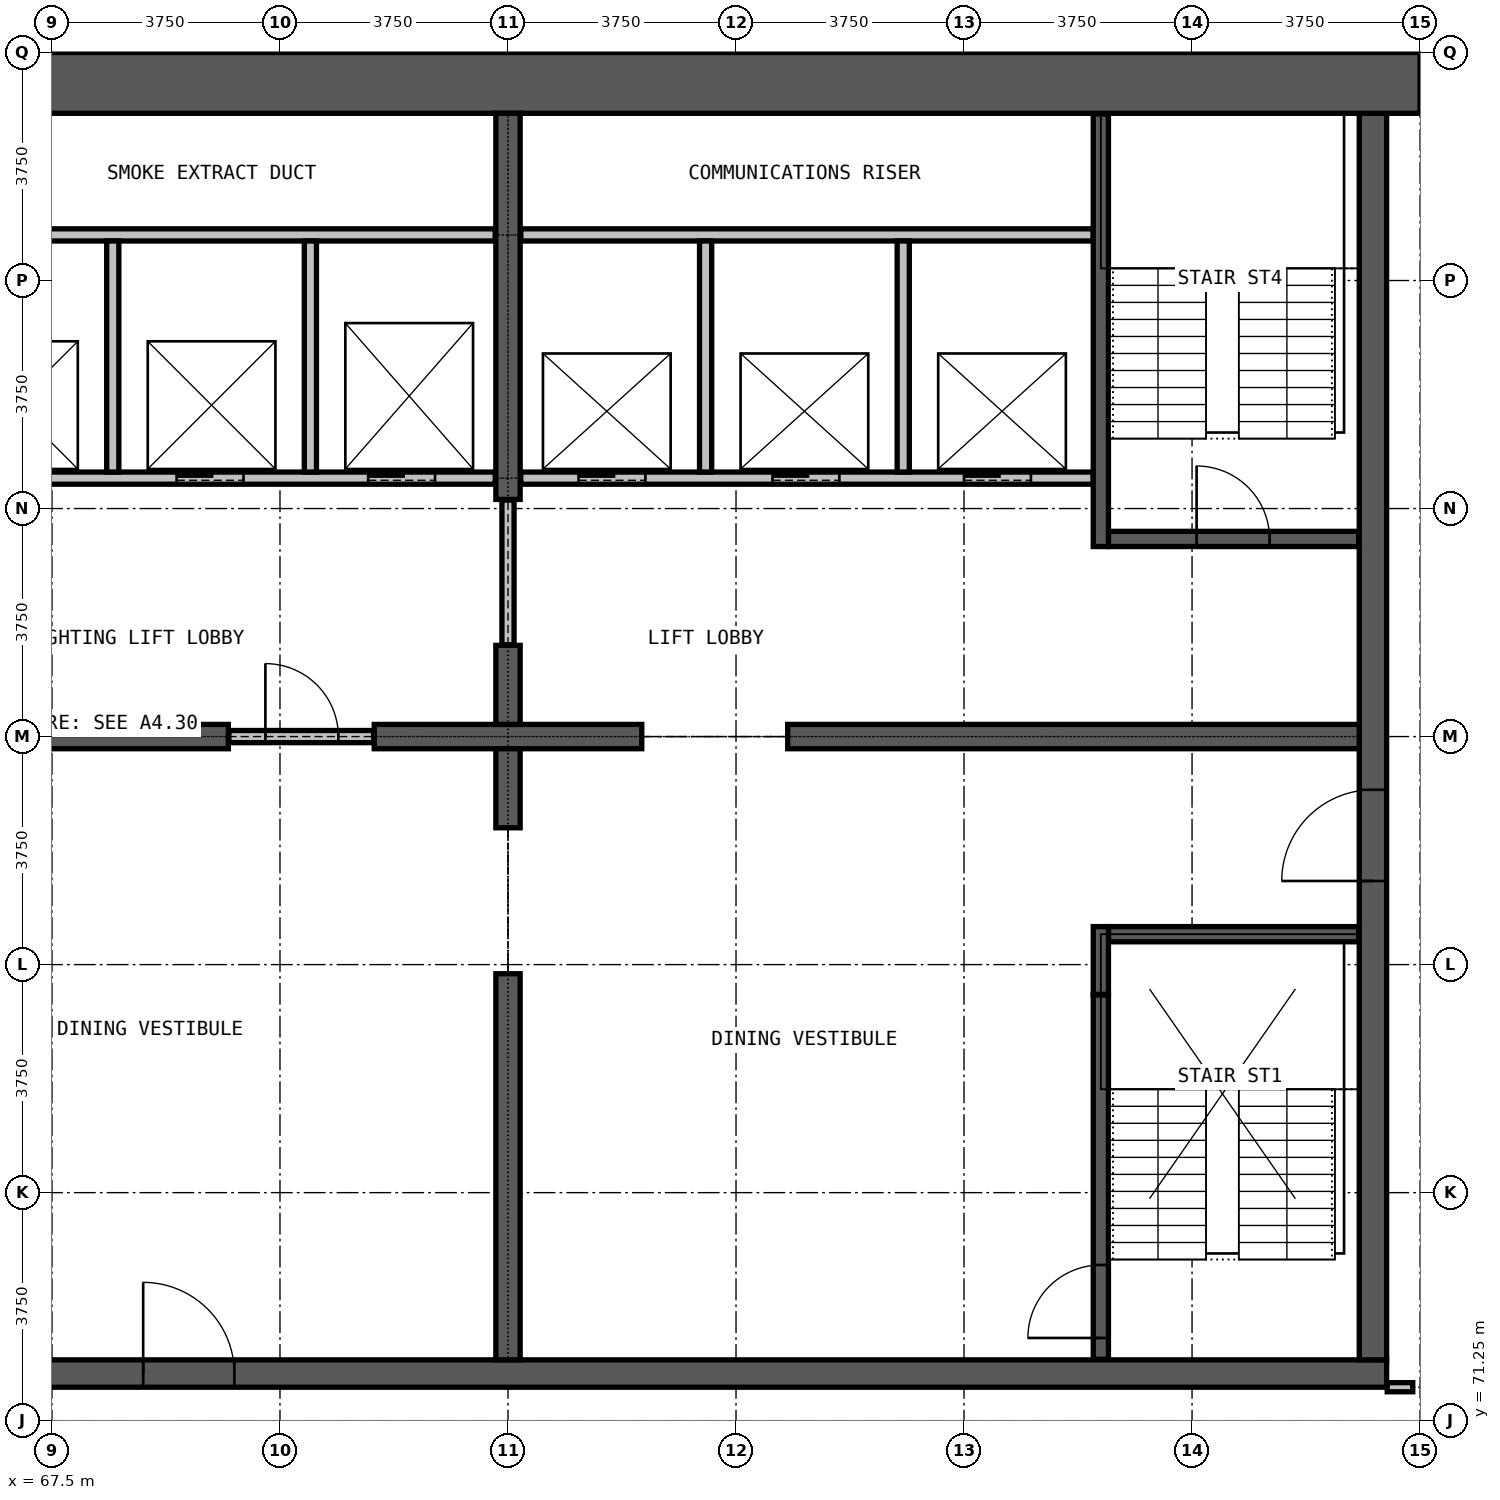
"""IFC4 building model, lengths in metres.
Left out: names, types, materials, properties, quantities, classifications, styles, units other than length and angle.
Written with IfcOpenShell. Run it as: python <this file> out.ifc"""

import sys

from ifc_helpers import new_model, si_unit, direction, frame, frame_2d, origin, place, context, subcontext, project, spatial, rectangle, extrude, element, fill, save


model = new_model("IFC4")
c1 = context("Model", 3, precision=1e-05, world=origin(), true_north=direction((0.0, 1.0)))
c2 = subcontext(c1, "Body", "Model", "MODEL_VIEW")
j1 = project(units=[si_unit("LENGTHUNIT", "METRE"), si_unit("PLANEANGLEUNIT", "RADIAN")], contexts=[c1])
p1 = place(None, origin())
s1 = spatial("IfcSite", under=j1, at=p1, CompositionType="ELEMENT")
p2 = place(p1, origin())
s2 = spatial("IfcBuilding", under=s1, at=p2, CompositionType="ELEMENT")
p3 = place(p2, frame((0.0, 0.0, 276.5)))
s3 = spatial("IfcBuildingStorey", under=s2, at=p3, CompositionType="ELEMENT", Elevation=276.5)
p4 = place(p3, frame((60.55, 72.025, 0.0), z_axis=(0.0, 0.0, 1.0), x_axis=(1.0, 0.0, 0.0)))
e1 = element("IfcWall", 1, at=p4, inside=s3, PredefinedType="SHEAR", context=c2, shape_type="SweptSolid", body=[
    extrude(rectangle(XDim=28.9, YDim=0.45, at=frame_2d((14.45, 0.0))), origin(), (0.0, 0.0, 1.0), 3.6),
])
p5 = place(p4, frame((8.45, 0.0, 0.0)))
e2 = element("IfcOpeningElement", 2, at=p5, cuts=e1, PredefinedType="OPENING", context=c2, shape_type="SweptSolid", body=[
    extrude(rectangle(XDim=1.5, YDim=2.2, at=frame_2d((0.75, 1.1))), frame((0.0, 0.235, 0.0), z_axis=(0.0, -1.0, 0.0), x_axis=(1.0, 0.0, 0.0)), (0.0, 0.0, 1.0), 0.47),
])
p6 = place(p3, frame((89.225, 72.25, 0.0), z_axis=(0.0, 0.0, 1.0), x_axis=(0.0, 1.0, 0.0)))
e3 = element("IfcWall", 3, at=p6, inside=s3, PredefinedType="SHEAR", context=c2, shape_type="SweptSolid", body=[
    extrude(rectangle(XDim=20.5, YDim=0.45, at=frame_2d((10.25, 0.0))), origin(), (0.0, 0.0, 1.0), 3.6),
])
p7 = place(p6, frame((7.875, 0.0, 0.0)))
e4 = element("IfcOpeningElement", 4, at=p7, cuts=e3, PredefinedType="OPENING", context=c2, shape_type="SweptSolid", body=[
    extrude(rectangle(XDim=1.5, YDim=2.2, at=frame_2d((0.75, 1.1))), frame((0.0, 0.235, 0.0), z_axis=(0.0, -1.0, 0.0), x_axis=(1.0, 0.0, 0.0)), (0.0, 0.0, 1.0), 0.47),
])
p8 = place(p3, frame((90.0, 93.25, 0.0), z_axis=(0.0, 0.0, 1.0), x_axis=(-1.0, 0.0, 0.0)))
e5 = element("IfcWall", 5, at=p8, inside=s3, PredefinedType="SHEAR", context=c2, shape_type="SweptSolid", body=[
    extrude(rectangle(XDim=30.0, YDim=1.0, at=frame_2d((15.0, 0.0))), origin(), (0.0, 0.0, 1.0), 3.6),
])
p9 = place(p3, frame((61.0, 82.5, 0.0), z_axis=(0.0, 0.0, 1.0), x_axis=(1.0, 0.0, 0.0)))
e6 = element("IfcWall", 6, at=p9, inside=s3, PredefinedType="SHEAR", context=c2, shape_type="SweptSolid", body=[
    extrude(rectangle(XDim=9.4, YDim=0.4, at=frame_2d((4.7, 0.0))), origin(), (0.0, 0.0, 1.0), 3.6),
])
p10 = place(p3, frame((72.8, 82.5, 0.0), z_axis=(0.0, 0.0, 1.0), x_axis=(1.0, 0.0, 0.0)))
e7 = element("IfcWall", 7, at=p10, inside=s3, PredefinedType="SHEAR", context=c2, shape_type="SweptSolid", body=[
    extrude(rectangle(XDim=4.4, YDim=0.4, at=frame_2d((2.2, 0.0))), origin(), (0.0, 0.0, 1.0), 3.6),
])
p11 = place(p3, frame((79.6, 82.5, 0.0), z_axis=(0.0, 0.0, 1.0), x_axis=(1.0, 0.0, 0.0)))
e8 = element("IfcWall", 8, at=p11, inside=s3, PredefinedType="SHEAR", context=c2, shape_type="SweptSolid", body=[
    extrude(rectangle(XDim=9.4, YDim=0.4, at=frame_2d((4.7, 0.0))), origin(), (0.0, 0.0, 1.0), 3.6),
])
p12 = place(p3, frame((75.0, 72.25, 0.0), z_axis=(0.0, 0.0, 1.0), x_axis=(0.0, 1.0, 0.0)))
e9 = element("IfcWall", 9, at=p12, inside=s3, PredefinedType="SHEAR", context=c2, shape_type="SweptSolid", body=[
    extrude(rectangle(XDim=6.35, YDim=0.4, at=frame_2d((3.175, 0.0))), origin(), (0.0, 0.0, 1.0), 3.6),
])
for number, where, z_axis, x_axis in (
    (10, (75.0, 81.0, 0.0), (0.0, 0.0, 1.0), (0.0, 1.0, 0.0)),
    (11, (75.0, 82.7, 0.0), (0.0, 0.0, 1.0), (0.0, 1.0, 0.0)),
):
    element("IfcWall", number, at=place(p3, frame(where, z_axis=z_axis, x_axis=x_axis)), inside=s3, PredefinedType="SHEAR", context=c2, shape_type="SweptSolid", body=[
        extrude(rectangle(XDim=1.3, YDim=0.4, at=frame_2d((0.65, 0.0))), origin(), (0.0, 0.0, 1.0), 3.6),
    ])
p13 = place(p3, frame((75.0, 86.4, 0.0), z_axis=(0.0, 0.0, 1.0), x_axis=(0.0, 1.0, 0.0)))
e12 = element("IfcWall", 12, at=p13, inside=s3, PredefinedType="SHEAR", context=c2, shape_type="SweptSolid", body=[
    extrude(rectangle(XDim=6.35, YDim=0.4, at=frame_2d((3.175, 0.0))), origin(), (0.0, 0.0, 1.0), 3.6),
])
p14 = place(p3, frame((70.41, 82.5, 0.0), z_axis=(0.0, 0.0, 1.0), x_axis=(1.0, 0.0, 0.0)))
e13 = element("IfcWall", 13, at=p14, inside=s3, PredefinedType="PARTITIONING", context=c2, shape_type="SweptSolid", body=[
    extrude(rectangle(XDim=2.38, YDim=0.2, at=frame_2d((1.19, 0.0))), origin(), (0.0, 0.0, 1.0), 2.4),
])
p15 = place(p14, frame((0.6, 0.0, 0.0)))
e14 = element("IfcOpeningElement", 14, at=p15, cuts=e13, PredefinedType="OPENING", context=c2, shape_type="SweptSolid", body=[
    extrude(rectangle(XDim=1.2, YDim=2.2, at=frame_2d((0.6, 1.1))), frame((0.0, 0.11, 0.0), z_axis=(0.0, -1.0, 0.0), x_axis=(1.0, 0.0, 0.0)), (0.0, 0.0, 1.0), 0.22),
])
p16 = place(p3, frame((75.0, 84.01, 0.0), z_axis=(0.0, 0.0, 1.0), x_axis=(0.0, 1.0, 0.0)))
e15 = element("IfcWall", 15, at=p16, inside=s3, PredefinedType="PARTITIONING", context=c2, shape_type="SweptSolid", body=[
    extrude(rectangle(XDim=2.38, YDim=0.2, at=frame_2d((1.19, 0.0))), origin(), (0.0, 0.0, 1.0), 2.4),
])
p17 = place(p3, frame((89.46, 71.8, 0.0), z_axis=(0.0, 0.0, 1.0), x_axis=(1.0, 0.0, 0.0)))
e16 = element("IfcWall", 16, at=p17, inside=s3, PredefinedType="PARTITIONING", context=c2, shape_type="SweptSolid", body=[
    extrude(rectangle(XDim=0.42, YDim=0.15, at=frame_2d((0.21, 0.0))), origin(), (0.0, 0.0, 1.0), 3.3),
])
p18 = place(p3, frame((65.375, 86.75, 0.0), z_axis=(0.0, 0.0, 1.0), x_axis=(1.0, 0.0, 0.0)))
e17 = element("IfcWall", 17, at=p18, inside=s3, PredefinedType="PARTITIONING", context=c2, shape_type="SweptSolid", body=[
    extrude(rectangle(XDim=9.415, YDim=0.2, at=frame_2d((4.708, 0.0))), origin(), (0.0, 0.0, 1.0), 3.3),
])
p19 = place(p18, frame((1.0, 0.0, 0.0)))
e18 = element("IfcOpeningElement", 18, at=p19, cuts=e17, PredefinedType="OPENING", context=c2, shape_type="SweptSolid", body=[
    extrude(rectangle(XDim=1.1, YDim=2.2, at=frame_2d((0.55, 1.1))), frame((0.0, 0.11, 0.0), z_axis=(0.0, -1.0, 0.0), x_axis=(1.0, 0.0, 0.0)), (0.0, 0.0, 1.0), 0.22),
])
p20 = place(p18, frame((4.175, 0.0, 0.0)))
e19 = element("IfcOpeningElement", 19, at=p20, cuts=e17, PredefinedType="OPENING", context=c2, shape_type="SweptSolid", body=[
    extrude(rectangle(XDim=1.1, YDim=2.2, at=frame_2d((0.55, 1.1))), frame((0.0, 0.11, 0.0), z_axis=(0.0, -1.0, 0.0), x_axis=(1.0, 0.0, 0.0)), (0.0, 0.0, 1.0), 0.22),
])
p21 = place(p18, frame((7.325, 0.0, 0.0)))
e20 = element("IfcOpeningElement", 20, at=p21, cuts=e17, PredefinedType="OPENING", context=c2, shape_type="SweptSolid", body=[
    extrude(rectangle(XDim=1.1, YDim=2.2, at=frame_2d((0.55, 1.1))), frame((0.0, 0.11, 0.0), z_axis=(0.0, -1.0, 0.0), x_axis=(1.0, 0.0, 0.0)), (0.0, 0.0, 1.0), 0.22),
])
p22 = place(p3, frame((75.21, 86.75, 0.0), z_axis=(0.0, 0.0, 1.0), x_axis=(1.0, 0.0, 0.0)))
e21 = element("IfcWall", 21, at=p22, inside=s3, PredefinedType="PARTITIONING", context=c2, shape_type="SweptSolid", body=[
    extrude(rectangle(XDim=9.415, YDim=0.2, at=frame_2d((4.708, 0.0))), origin(), (0.0, 0.0, 1.0), 3.3),
])
p23 = place(p22, frame((0.95, 0.0, 0.0)))
e22 = element("IfcOpeningElement", 22, at=p23, cuts=e21, PredefinedType="OPENING", context=c2, shape_type="SweptSolid", body=[
    extrude(rectangle(XDim=1.1, YDim=2.2, at=frame_2d((0.55, 1.1))), frame((0.0, 0.11, 0.0), z_axis=(0.0, -1.0, 0.0), x_axis=(1.0, 0.0, 0.0)), (0.0, 0.0, 1.0), 0.22),
])
p24 = place(p22, frame((4.14, 0.0, 0.0)))
e23 = element("IfcOpeningElement", 23, at=p24, cuts=e21, PredefinedType="OPENING", context=c2, shape_type="SweptSolid", body=[
    extrude(rectangle(XDim=1.1, YDim=2.2, at=frame_2d((0.55, 1.1))), frame((0.0, 0.11, 0.0), z_axis=(0.0, -1.0, 0.0), x_axis=(1.0, 0.0, 0.0)), (0.0, 0.0, 1.0), 0.22),
])
p25 = place(p22, frame((7.29, 0.0, 0.0)))
e24 = element("IfcOpeningElement", 24, at=p25, cuts=e21, PredefinedType="OPENING", context=c2, shape_type="SweptSolid", body=[
    extrude(rectangle(XDim=1.1, YDim=2.2, at=frame_2d((0.55, 1.1))), frame((0.0, 0.11, 0.0), z_axis=(0.0, -1.0, 0.0), x_axis=(1.0, 0.0, 0.0)), (0.0, 0.0, 1.0), 0.22),
])
for number, where, z_axis, x_axis in (
    (25, (65.375, 90.75, 0.0), (0.0, 0.0, 1.0), (1.0, 0.0, 0.0)),
    (26, (75.21, 90.75, 0.0), (0.0, 0.0, 1.0), (1.0, 0.0, 0.0)),
):
    element("IfcWall", number, at=place(p3, frame(where, z_axis=z_axis, x_axis=x_axis)), inside=s3, PredefinedType="PARTITIONING", context=c2, shape_type="SweptSolid", body=[
        extrude(rectangle(XDim=9.415, YDim=0.2, at=frame_2d((4.708, 0.0))), origin(), (0.0, 0.0, 1.0), 3.3),
    ])
for number, where, z_axis, x_axis in (
    (27, (68.5, 86.85, 0.0), (0.0, 0.0, 1.0), (0.0, 1.0, 0.0)),
    (28, (71.75, 86.85, 0.0), (0.0, 0.0, 1.0), (0.0, 1.0, 0.0)),
    (29, (78.25, 86.85, 0.0), (0.0, 0.0, 1.0), (0.0, 1.0, 0.0)),
    (30, (81.5, 86.85, 0.0), (0.0, 0.0, 1.0), (0.0, 1.0, 0.0)),
):
    element("IfcWall", number, at=place(p3, frame(where, z_axis=z_axis, x_axis=x_axis)), inside=s3, PredefinedType="PARTITIONING", context=c2, shape_type="SweptSolid", body=[
        extrude(rectangle(XDim=3.8, YDim=0.2, at=frame_2d((1.9, 0.0))), origin(), (0.0, 0.0, 1.0), 3.3),
    ])
p26 = place(p3, frame((84.875, 79.25, 0.0), z_axis=(0.0, 0.0, 1.0), x_axis=(1.0, 0.0, 0.0)))
e31 = element("IfcWall", 31, at=p26, inside=s3, PredefinedType="PARTITIONING", context=c2, shape_type="SweptSolid", body=[
    extrude(rectangle(XDim=4.115, YDim=0.25, at=frame_2d((2.058, 0.0))), origin(), (0.0, 0.0, 1.0), 3.3),
])
p27 = place(p3, frame((84.875, 85.75, 0.0), z_axis=(0.0, 0.0, 1.0), x_axis=(1.0, 0.0, 0.0)))
e32 = element("IfcWall", 32, at=p27, inside=s3, PredefinedType="PARTITIONING", context=c2, shape_type="SweptSolid", body=[
    extrude(rectangle(XDim=4.115, YDim=0.25, at=frame_2d((2.058, 0.0))), origin(), (0.0, 0.0, 1.0), 3.3),
])
p28 = place(p27, frame((1.45, 0.0, 0.0)))
e33 = element("IfcOpeningElement", 33, at=p28, cuts=e32, PredefinedType="OPENING", context=c2, shape_type="SweptSolid", body=[
    extrude(rectangle(XDim=1.2, YDim=2.2, at=frame_2d((0.6, 1.1))), frame((0.0, 0.135, 0.0), z_axis=(0.0, -1.0, 0.0), x_axis=(1.0, 0.0, 0.0)), (0.0, 0.0, 1.0), 0.27),
])
p29 = place(p3, frame((84.75, 72.26, 0.0), z_axis=(0.0, 0.0, 1.0), x_axis=(0.0, 1.0, 0.0)))
e34 = element("IfcWall", 34, at=p29, inside=s3, PredefinedType="PARTITIONING", context=c2, shape_type="SweptSolid", body=[
    extrude(rectangle(XDim=5.99, YDim=0.25, at=frame_2d((2.995, 0.0))), origin(), (0.0, 0.0, 1.0), 3.3),
])
p30 = place(p29, frame((0.35, 0.0, 0.0)))
e35 = element("IfcOpeningElement", 35, at=p30, cuts=e34, PredefinedType="OPENING", context=c2, shape_type="SweptSolid", body=[
    extrude(rectangle(XDim=1.2, YDim=2.2, at=frame_2d((0.6, 1.1))), frame((0.0, 0.135, 0.0), z_axis=(0.0, -1.0, 0.0), x_axis=(1.0, 0.0, 0.0)), (0.0, 0.0, 1.0), 0.27),
])
p31 = place(p3, frame((84.75, 78.26, 0.0), z_axis=(0.0, 0.0, 1.0), x_axis=(0.0, 1.0, 0.0)))
e36 = element("IfcWall", 36, at=p31, inside=s3, PredefinedType="PARTITIONING", context=c2, shape_type="SweptSolid", body=[
    extrude(rectangle(XDim=1.115, YDim=0.25, at=frame_2d((0.558, 0.0))), origin(), (0.0, 0.0, 1.0), 3.3),
])
p32 = place(p3, frame((84.75, 85.625, 0.0), z_axis=(0.0, 0.0, 1.0), x_axis=(0.0, 1.0, 0.0)))
e37 = element("IfcWall", 37, at=p32, inside=s3, PredefinedType="PARTITIONING", context=c2, shape_type="SweptSolid", body=[
    extrude(rectangle(XDim=7.115, YDim=0.25, at=frame_2d((3.558, 0.0))), origin(), (0.0, 0.0, 1.0), 3.3),
])
p33 = place(p23, origin())
e38 = element("IfcDoor", 38, at=p33, inside=s3, OperationType="DOUBLE_DOOR_SLIDING", PredefinedType="DOOR", context=c2, shape_type="SweptSolid", body=[
    extrude(rectangle(XDim=1.1, YDim=2.2, at=frame_2d((0.55, 1.1))), frame((0.0, 0.025, 0.0), z_axis=(0.0, -1.0, 0.0), x_axis=(1.0, 0.0, 0.0)), (0.0, 0.0, 1.0), 0.05),
])
fill(e22, e38)
p34 = place(p24, origin())
e39 = element("IfcDoor", 39, at=p34, inside=s3, OperationType="DOUBLE_DOOR_SLIDING", PredefinedType="DOOR", context=c2, shape_type="SweptSolid", body=[
    extrude(rectangle(XDim=1.1, YDim=2.2, at=frame_2d((0.55, 1.1))), frame((0.0, 0.025, 0.0), z_axis=(0.0, -1.0, 0.0), x_axis=(1.0, 0.0, 0.0)), (0.0, 0.0, 1.0), 0.05),
])
fill(e23, e39)
p35 = place(p25, origin())
e40 = element("IfcDoor", 40, at=p35, inside=s3, OperationType="DOUBLE_DOOR_SLIDING", PredefinedType="DOOR", context=c2, shape_type="SweptSolid", body=[
    extrude(rectangle(XDim=1.1, YDim=2.2, at=frame_2d((0.55, 1.1))), frame((0.0, 0.025, 0.0), z_axis=(0.0, -1.0, 0.0), x_axis=(1.0, 0.0, 0.0)), (0.0, 0.0, 1.0), 0.05),
])
fill(e24, e40)
p36 = place(p20, origin())
e41 = element("IfcDoor", 41, at=p36, inside=s3, OperationType="DOUBLE_DOOR_SLIDING", PredefinedType="DOOR", context=c2, shape_type="SweptSolid", body=[
    extrude(rectangle(XDim=1.1, YDim=2.2, at=frame_2d((0.55, 1.1))), frame((0.0, 0.025, 0.0), z_axis=(0.0, -1.0, 0.0), x_axis=(1.0, 0.0, 0.0)), (0.0, 0.0, 1.0), 0.05),
])
fill(e19, e41)
p37 = place(p21, origin())
e42 = element("IfcDoor", 42, at=p37, inside=s3, OperationType="DOUBLE_DOOR_SLIDING", PredefinedType="DOOR", context=c2, shape_type="SweptSolid", body=[
    extrude(rectangle(XDim=1.1, YDim=2.2, at=frame_2d((0.55, 1.1))), frame((0.0, 0.025, 0.0), z_axis=(0.0, -1.0, 0.0), x_axis=(1.0, 0.0, 0.0)), (0.0, 0.0, 1.0), 0.05),
])
fill(e20, e42)
p38 = place(p15, origin())
e43 = element("IfcDoor", 43, at=p38, inside=s3, OperationType="SINGLE_SWING_LEFT", PredefinedType="DOOR", context=c2, shape_type="SweptSolid", body=[
    extrude(rectangle(XDim=1.2, YDim=2.2, at=frame_2d((0.6, 1.1))), frame((0.0, 0.025, 0.0), z_axis=(0.0, -1.0, 0.0), x_axis=(1.0, 0.0, 0.0)), (0.0, 0.0, 1.0), 0.05),
])
fill(e14, e43)
p39 = place(p28, origin())
e44 = element("IfcDoor", 44, at=p39, inside=s3, OperationType="SINGLE_SWING_RIGHT", PredefinedType="DOOR", context=c2, shape_type="SweptSolid", body=[
    extrude(rectangle(XDim=1.2, YDim=2.2, at=frame_2d((0.6, 1.1))), frame((0.0, 0.025, 0.0), z_axis=(0.0, -1.0, 0.0), x_axis=(1.0, 0.0, 0.0)), (0.0, 0.0, 1.0), 0.05),
])
fill(e33, e44)
p40 = place(p30, origin())
e45 = element("IfcDoor", 45, at=p40, inside=s3, OperationType="SINGLE_SWING_LEFT", PredefinedType="DOOR", context=c2, shape_type="SweptSolid", body=[
    extrude(rectangle(XDim=1.2, YDim=2.2, at=frame_2d((0.6, 1.1))), frame((0.0, 0.025, 0.0), z_axis=(0.0, -1.0, 0.0), x_axis=(1.0, 0.0, 0.0)), (0.0, 0.0, 1.0), 0.05),
])
fill(e35, e45)
p41 = place(p5, origin())
e46 = element("IfcDoor", 46, at=p41, inside=s3, OperationType="DOUBLE_DOOR_SINGLE_SWING", PredefinedType="DOOR", context=c2, shape_type="SweptSolid", body=[
    extrude(rectangle(XDim=1.5, YDim=2.2, at=frame_2d((0.75, 1.1))), frame((0.0, 0.025, 0.0), z_axis=(0.0, -1.0, 0.0), x_axis=(1.0, 0.0, 0.0)), (0.0, 0.0, 1.0), 0.05),
])
fill(e2, e46)
p42 = place(p7, origin())
e47 = element("IfcDoor", 47, at=p42, inside=s3, OperationType="DOUBLE_DOOR_SINGLE_SWING", PredefinedType="DOOR", context=c2, shape_type="SweptSolid", body=[
    extrude(rectangle(XDim=1.5, YDim=2.2, at=frame_2d((0.75, 1.1))), frame((0.0, 0.025, 0.0), z_axis=(0.0, -1.0, 0.0), x_axis=(1.0, 0.0, 0.0)), (0.0, 0.0, 1.0), 0.05),
])
fill(e4, e47)
save(model, sys.argv[1])
